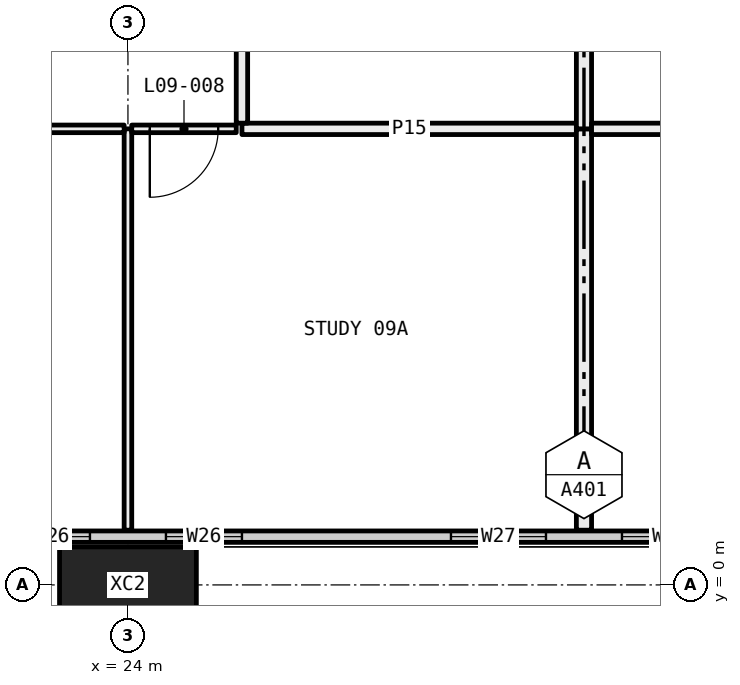
"""IFC4 building model, lengths in metres.
Left out: names, types, materials, properties, quantities, classifications, styles, units other than length and angle.
Written with IfcOpenShell. Run it as: python <this file> out.ifc"""

import sys

from ifc_helpers import new_model, si_unit, direction, frame, frame_2d, origin, origin_2d, place, context, subcontext, project, spatial, rectangle, hollow_rectangle, extrude, element, fill, save


model = new_model("IFC4")
c1 = context("Model", 3, precision=1e-05, world=origin(), true_north=direction((0.0, 1.0)))
c2 = subcontext(c1, "Body", "Model", "MODEL_VIEW")
j1 = project(units=[si_unit("LENGTHUNIT", "METRE"), si_unit("PLANEANGLEUNIT", "RADIAN")], contexts=[c1])
p1 = place(None, origin())
s1 = spatial("IfcSite", under=j1, at=p1, CompositionType="ELEMENT")
p2 = place(p1, origin())
s2 = spatial("IfcBuilding", under=s1, at=p2, CompositionType="ELEMENT")
p3 = place(p2, frame((0.0, 0.0, 43.8)))
s3 = spatial("IfcBuildingStorey", under=s2, at=p3, CompositionType="ELEMENT", Elevation=43.8)
p4 = place(p3, frame((24.0, 0.0, -0.4), z_axis=(0.0, 0.0, 1.0), x_axis=(1.0, 0.0, 0.0)))
e1 = element("IfcColumn", 1, at=p4, inside=s3, PredefinedType="COLUMN", context=c2, shape_type="SweptSolid", body=[
    extrude(hollow_rectangle(XDim=1.8, YDim=1.0, WallThickness=0.07, at=origin_2d()), origin(), (0.0, 0.0, 1.0), 3.45),
])
p5 = place(p3, frame((6.56, 0.635, 0.0), z_axis=(0.0, 0.0, 1.0), x_axis=(1.0, 0.0, 0.0)))
e2 = element("IfcWall", 2, at=p5, inside=s3, PredefinedType="ELEMENTEDWALL", context=c2, shape_type="SweptSolid", body=[
    extrude(rectangle(XDim=58.88, YDim=0.15, at=frame_2d((29.44, 0.0))), origin(), (0.0, 0.0, 1.0), 3.05),
])
p6 = place(p5, frame((0.44, 0.0, 0.45)))
e3 = element("IfcOpeningElement", 3, at=p6, cuts=e2, PredefinedType="OPENING", context=c2, shape_type="SweptSolid", body=[
    extrude(rectangle(XDim=4.5, YDim=2.55, at=frame_2d((2.25, 1.275))), frame((0.0, 0.085, 0.0), z_axis=(0.0, -1.0, 0.0), x_axis=(1.0, 0.0, 0.0)), (0.0, 0.0, 1.0), 0.17),
])
p7 = place(p5, frame((5.94, 0.0, 0.45)))
e4 = element("IfcOpeningElement", 4, at=p7, cuts=e2, PredefinedType="OPENING", context=c2, shape_type="SweptSolid", body=[
    extrude(rectangle(XDim=1.0, YDim=2.55, at=frame_2d((0.5, 1.275))), frame((0.0, 0.085, 0.0), z_axis=(0.0, -1.0, 0.0), x_axis=(1.0, 0.0, 0.0)), (0.0, 0.0, 1.0), 0.17),
])
p8 = place(p5, frame((9.69, 0.0, 0.45)))
e5 = element("IfcOpeningElement", 5, at=p8, cuts=e2, PredefinedType="OPENING", context=c2, shape_type="SweptSolid", body=[
    extrude(rectangle(XDim=1.25, YDim=2.55, at=frame_2d((0.625, 1.275))), frame((0.0, 0.085, 0.0), z_axis=(0.0, -1.0, 0.0), x_axis=(1.0, 0.0, 0.0)), (0.0, 0.0, 1.0), 0.17),
])
p9 = place(p5, frame((11.94, 0.0, 0.45)))
e6 = element("IfcOpeningElement", 6, at=p9, cuts=e2, PredefinedType="OPENING", context=c2, shape_type="SweptSolid", body=[
    extrude(rectangle(XDim=1.25, YDim=2.55, at=frame_2d((0.625, 1.275))), frame((0.0, 0.085, 0.0), z_axis=(0.0, -1.0, 0.0), x_axis=(1.0, 0.0, 0.0)), (0.0, 0.0, 1.0), 0.17),
])
p10 = place(p5, frame((15.94, 0.0, 0.45)))
e7 = element("IfcOpeningElement", 7, at=p10, cuts=e2, PredefinedType="OPENING", context=c2, shape_type="SweptSolid", body=[
    extrude(rectangle(XDim=1.0, YDim=2.55, at=frame_2d((0.5, 1.275))), frame((0.0, 0.085, 0.0), z_axis=(0.0, -1.0, 0.0), x_axis=(1.0, 0.0, 0.0)), (0.0, 0.0, 1.0), 0.17),
])
p11 = place(p5, frame((17.94, 0.0, 0.45)))
e8 = element("IfcOpeningElement", 8, at=p11, cuts=e2, PredefinedType="OPENING", context=c2, shape_type="SweptSolid", body=[
    extrude(rectangle(XDim=1.0, YDim=2.55, at=frame_2d((0.5, 1.275))), frame((0.0, 0.085, 0.0), z_axis=(0.0, -1.0, 0.0), x_axis=(1.0, 0.0, 0.0)), (0.0, 0.0, 1.0), 0.17),
])
p12 = place(p5, frame((21.69, 0.0, 0.45)))
e9 = element("IfcOpeningElement", 9, at=p12, cuts=e2, PredefinedType="OPENING", context=c2, shape_type="SweptSolid", body=[
    extrude(rectangle(XDim=1.25, YDim=2.55, at=frame_2d((0.625, 1.275))), frame((0.0, 0.085, 0.0), z_axis=(0.0, -1.0, 0.0), x_axis=(1.0, 0.0, 0.0)), (0.0, 0.0, 1.0), 0.17),
])
p13 = place(p5, frame((23.94, 0.0, 0.45)))
e10 = element("IfcOpeningElement", 10, at=p13, cuts=e2, PredefinedType="OPENING", context=c2, shape_type="SweptSolid", body=[
    extrude(rectangle(XDim=1.25, YDim=2.55, at=frame_2d((0.625, 1.275))), frame((0.0, 0.085, 0.0), z_axis=(0.0, -1.0, 0.0), x_axis=(1.0, 0.0, 0.0)), (0.0, 0.0, 1.0), 0.17),
])
p14 = place(p5, frame((27.94, 0.0, 0.45)))
e11 = element("IfcOpeningElement", 11, at=p14, cuts=e2, PredefinedType="OPENING", context=c2, shape_type="SweptSolid", body=[
    extrude(rectangle(XDim=1.0, YDim=2.55, at=frame_2d((0.5, 1.275))), frame((0.0, 0.085, 0.0), z_axis=(0.0, -1.0, 0.0), x_axis=(1.0, 0.0, 0.0)), (0.0, 0.0, 1.0), 0.17),
])
p15 = place(p5, frame((29.94, 0.0, 0.45)))
e12 = element("IfcOpeningElement", 12, at=p15, cuts=e2, PredefinedType="OPENING", context=c2, shape_type="SweptSolid", body=[
    extrude(rectangle(XDim=1.0, YDim=2.55, at=frame_2d((0.5, 1.275))), frame((0.0, 0.085, 0.0), z_axis=(0.0, -1.0, 0.0), x_axis=(1.0, 0.0, 0.0)), (0.0, 0.0, 1.0), 0.17),
])
p16 = place(p5, frame((33.69, 0.0, 0.45)))
e13 = element("IfcOpeningElement", 13, at=p16, cuts=e2, PredefinedType="OPENING", context=c2, shape_type="SweptSolid", body=[
    extrude(rectangle(XDim=1.25, YDim=2.55, at=frame_2d((0.625, 1.275))), frame((0.0, 0.085, 0.0), z_axis=(0.0, -1.0, 0.0), x_axis=(1.0, 0.0, 0.0)), (0.0, 0.0, 1.0), 0.17),
])
p17 = place(p5, frame((35.94, 0.0, 0.45)))
e14 = element("IfcOpeningElement", 14, at=p17, cuts=e2, PredefinedType="OPENING", context=c2, shape_type="SweptSolid", body=[
    extrude(rectangle(XDim=1.25, YDim=2.55, at=frame_2d((0.625, 1.275))), frame((0.0, 0.085, 0.0), z_axis=(0.0, -1.0, 0.0), x_axis=(1.0, 0.0, 0.0)), (0.0, 0.0, 1.0), 0.17),
])
p18 = place(p5, frame((39.94, 0.0, 0.45)))
e15 = element("IfcOpeningElement", 15, at=p18, cuts=e2, PredefinedType="OPENING", context=c2, shape_type="SweptSolid", body=[
    extrude(rectangle(XDim=1.0, YDim=2.55, at=frame_2d((0.5, 1.275))), frame((0.0, 0.085, 0.0), z_axis=(0.0, -1.0, 0.0), x_axis=(1.0, 0.0, 0.0)), (0.0, 0.0, 1.0), 0.17),
])
p19 = place(p5, frame((41.94, 0.0, 0.45)))
e16 = element("IfcOpeningElement", 16, at=p19, cuts=e2, PredefinedType="OPENING", context=c2, shape_type="SweptSolid", body=[
    extrude(rectangle(XDim=1.0, YDim=2.55, at=frame_2d((0.5, 1.275))), frame((0.0, 0.085, 0.0), z_axis=(0.0, -1.0, 0.0), x_axis=(1.0, 0.0, 0.0)), (0.0, 0.0, 1.0), 0.17),
])
p20 = place(p5, frame((45.69, 0.0, 0.45)))
e17 = element("IfcOpeningElement", 17, at=p20, cuts=e2, PredefinedType="OPENING", context=c2, shape_type="SweptSolid", body=[
    extrude(rectangle(XDim=1.25, YDim=2.55, at=frame_2d((0.625, 1.275))), frame((0.0, 0.085, 0.0), z_axis=(0.0, -1.0, 0.0), x_axis=(1.0, 0.0, 0.0)), (0.0, 0.0, 1.0), 0.17),
])
p21 = place(p5, frame((47.94, 0.0, 0.45)))
e18 = element("IfcOpeningElement", 18, at=p21, cuts=e2, PredefinedType="OPENING", context=c2, shape_type="SweptSolid", body=[
    extrude(rectangle(XDim=1.25, YDim=2.55, at=frame_2d((0.625, 1.275))), frame((0.0, 0.085, 0.0), z_axis=(0.0, -1.0, 0.0), x_axis=(1.0, 0.0, 0.0)), (0.0, 0.0, 1.0), 0.17),
])
p22 = place(p5, frame((51.94, 0.0, 0.45)))
e19 = element("IfcOpeningElement", 19, at=p22, cuts=e2, PredefinedType="OPENING", context=c2, shape_type="SweptSolid", body=[
    extrude(rectangle(XDim=1.0, YDim=2.55, at=frame_2d((0.5, 1.275))), frame((0.0, 0.085, 0.0), z_axis=(0.0, -1.0, 0.0), x_axis=(1.0, 0.0, 0.0)), (0.0, 0.0, 1.0), 0.17),
])
p23 = place(p5, frame((53.94, 0.0, 0.45)))
e20 = element("IfcOpeningElement", 20, at=p23, cuts=e2, PredefinedType="OPENING", context=c2, shape_type="SweptSolid", body=[
    extrude(rectangle(XDim=4.5, YDim=2.55, at=frame_2d((2.25, 1.275))), frame((0.0, 0.085, 0.0), z_axis=(0.0, -1.0, 0.0), x_axis=(1.0, 0.0, 0.0)), (0.0, 0.0, 1.0), 0.17),
])
p24 = place(p3, frame((24.0, 0.72, 0.0), z_axis=(0.0, 0.0, 1.0), x_axis=(0.0, 1.0, 0.0)))
e21 = element("IfcWall", 21, at=p24, inside=s3, PredefinedType="PARTITIONING", context=c2, shape_type="SweptSolid", body=[
    extrude(rectangle(XDim=5.28, YDim=0.1, at=frame_2d((2.64, 0.0))), origin(), (0.0, 0.0, 1.0), 2.45),
])
p25 = place(p3, frame((23.95, 6.0, 0.0), z_axis=(0.0, 0.0, 1.0), x_axis=(-1.0, 0.0, 0.0)))
e22 = element("IfcWall", 22, at=p25, inside=s3, PredefinedType="PARTITIONING", context=c2, shape_type="SweptSolid", body=[
    extrude(rectangle(XDim=4.95, YDim=0.1, at=frame_2d((2.475, 0.0))), origin(), (0.0, 0.0, 1.0), 2.45),
])
p26 = place(p3, frame((25.425, 6.0, 0.0), z_axis=(0.0, 0.0, 1.0), x_axis=(-1.0, 0.0, 0.0)))
e23 = element("IfcWall", 23, at=p26, inside=s3, PredefinedType="PARTITIONING", context=c2, shape_type="SweptSolid", body=[
    extrude(rectangle(XDim=1.375, YDim=0.1, at=frame_2d((0.688, 0.0))), origin(), (0.0, 0.0, 1.0), 2.45),
])
p27 = place(p26, frame((0.238, 0.0, 0.0)))
e24 = element("IfcOpeningElement", 24, at=p27, cuts=e23, PredefinedType="OPENING", context=c2, shape_type="SweptSolid", body=[
    extrude(rectangle(XDim=0.9, YDim=2.1, at=frame_2d((0.45, 1.05))), frame((0.0, 0.06, 0.0), z_axis=(0.0, -1.0, 0.0), x_axis=(1.0, 0.0, 0.0)), (0.0, 0.0, 1.0), 0.12),
])
p28 = place(p3, frame((29.9, 6.0, 0.0), z_axis=(0.0, 0.0, 1.0), x_axis=(-1.0, 0.0, 0.0)))
e25 = element("IfcWall", 25, at=p28, inside=s3, PredefinedType="PARTITIONING", context=c2, shape_type="SweptSolid", body=[
    extrude(rectangle(XDim=4.4, YDim=0.15, at=frame_2d((2.2, 0.0))), origin(), (0.0, 0.0, 1.0), 3.05),
])
p29 = place(p3, frame((30.0, 0.72, 0.0), z_axis=(0.0, 0.0, 1.0), x_axis=(0.0, 1.0, 0.0)))
e26 = element("IfcWall", 26, at=p29, inside=s3, PredefinedType="PARTITIONING", context=c2, shape_type="SweptSolid", body=[
    extrude(rectangle(XDim=5.28, YDim=0.2, at=frame_2d((2.64, 0.0))), origin(), (0.0, 0.0, 1.0), 3.05),
])
p30 = place(p3, frame((25.5, 6.075, 0.0), z_axis=(0.0, 0.0, 1.0), x_axis=(0.0, 1.0, 0.0)))
e27 = element("IfcWall", 27, at=p30, inside=s3, PredefinedType="PARTITIONING", context=c2, shape_type="SweptSolid", body=[
    extrude(rectangle(XDim=2.925, YDim=0.15, at=frame_2d((1.462, 0.0))), origin(), (0.0, 0.0, 1.0), 3.05),
])
p31 = place(p30, frame((1.012, 0.0, 0.0)))
e28 = element("IfcOpeningElement", 28, at=p31, cuts=e27, PredefinedType="OPENING", context=c2, shape_type="SweptSolid", body=[
    extrude(rectangle(XDim=0.9, YDim=2.1, at=frame_2d((0.45, 1.05))), frame((0.0, 0.085, 0.0), z_axis=(0.0, -1.0, 0.0), x_axis=(1.0, 0.0, 0.0)), (0.0, 0.0, 1.0), 0.17),
])
p32 = place(p3, frame((30.0, 6.0, 0.0), z_axis=(0.0, 0.0, 1.0), x_axis=(0.0, 1.0, 0.0)))
e29 = element("IfcWall", 29, at=p32, inside=s3, PredefinedType="PARTITIONING", context=c2, shape_type="SweptSolid", body=[
    extrude(rectangle(XDim=3.0, YDim=0.2, at=frame_2d((1.5, 0.0))), origin(), (0.0, 0.0, 1.0), 3.05),
])
p33 = place(p3, frame((34.5, 6.0, 0.0), z_axis=(0.0, 0.0, 1.0), x_axis=(-1.0, 0.0, 0.0)))
e30 = element("IfcWall", 30, at=p33, inside=s3, PredefinedType="PARTITIONING", context=c2, shape_type="SweptSolid", body=[
    extrude(rectangle(XDim=4.4, YDim=0.15, at=frame_2d((2.2, 0.0))), origin(), (0.0, 0.0, 1.0), 3.05),
])
p34 = place(p33, frame((1.75, 0.0, 0.0)))
e31 = element("IfcOpeningElement", 31, at=p34, cuts=e30, PredefinedType="OPENING", context=c2, shape_type="SweptSolid", body=[
    extrude(rectangle(XDim=0.9, YDim=2.1, at=frame_2d((0.45, 1.05))), frame((0.0, 0.085, 0.0), z_axis=(0.0, -1.0, 0.0), x_axis=(1.0, 0.0, 0.0)), (0.0, 0.0, 1.0), 0.17),
])
p35 = place(p10, origin())
e32 = element("IfcWindow", 32, at=p35, inside=s3, PartitioningType="SINGLE_PANEL", PredefinedType="WINDOW", context=c2, shape_type="SweptSolid", body=[
    extrude(rectangle(XDim=1.0, YDim=2.55, at=frame_2d((0.5, 1.275))), frame((0.0, 0.03, 0.0), z_axis=(0.0, -1.0, 0.0), x_axis=(1.0, 0.0, 0.0)), (0.0, 0.0, 1.0), 0.06),
])
fill(e7, e32)
p36 = place(p11, origin())
e33 = element("IfcWindow", 33, at=p36, inside=s3, PartitioningType="SINGLE_PANEL", PredefinedType="WINDOW", context=c2, shape_type="SweptSolid", body=[
    extrude(rectangle(XDim=1.0, YDim=2.55, at=frame_2d((0.5, 1.275))), frame((0.0, 0.03, 0.0), z_axis=(0.0, -1.0, 0.0), x_axis=(1.0, 0.0, 0.0)), (0.0, 0.0, 1.0), 0.06),
])
fill(e8, e33)
p37 = place(p12, origin())
e34 = element("IfcWindow", 34, at=p37, inside=s3, PartitioningType="SINGLE_PANEL", PredefinedType="WINDOW", context=c2, shape_type="SweptSolid", body=[
    extrude(rectangle(XDim=1.25, YDim=2.55, at=frame_2d((0.625, 1.275))), frame((0.0, 0.03, 0.0), z_axis=(0.0, -1.0, 0.0), x_axis=(1.0, 0.0, 0.0)), (0.0, 0.0, 1.0), 0.06),
])
fill(e9, e34)
p38 = place(p13, origin())
e35 = element("IfcWindow", 35, at=p38, inside=s3, PartitioningType="SINGLE_PANEL", PredefinedType="WINDOW", context=c2, shape_type="SweptSolid", body=[
    extrude(rectangle(XDim=1.25, YDim=2.55, at=frame_2d((0.625, 1.275))), frame((0.0, 0.03, 0.0), z_axis=(0.0, -1.0, 0.0), x_axis=(1.0, 0.0, 0.0)), (0.0, 0.0, 1.0), 0.06),
])
fill(e10, e35)
p39 = place(p27, origin())
e36 = element("IfcDoor", 36, at=p39, inside=s3, OperationType="SINGLE_SWING_LEFT", PredefinedType="DOOR", context=c2, shape_type="SweptSolid", body=[
    extrude(rectangle(XDim=0.9, YDim=2.1, at=frame_2d((0.45, 1.05))), frame((0.0, 0.025, 0.0), z_axis=(0.0, -1.0, 0.0), x_axis=(1.0, 0.0, 0.0)), (0.0, 0.0, 1.0), 0.05),
])
fill(e24, e36)
save(model, sys.argv[1])
